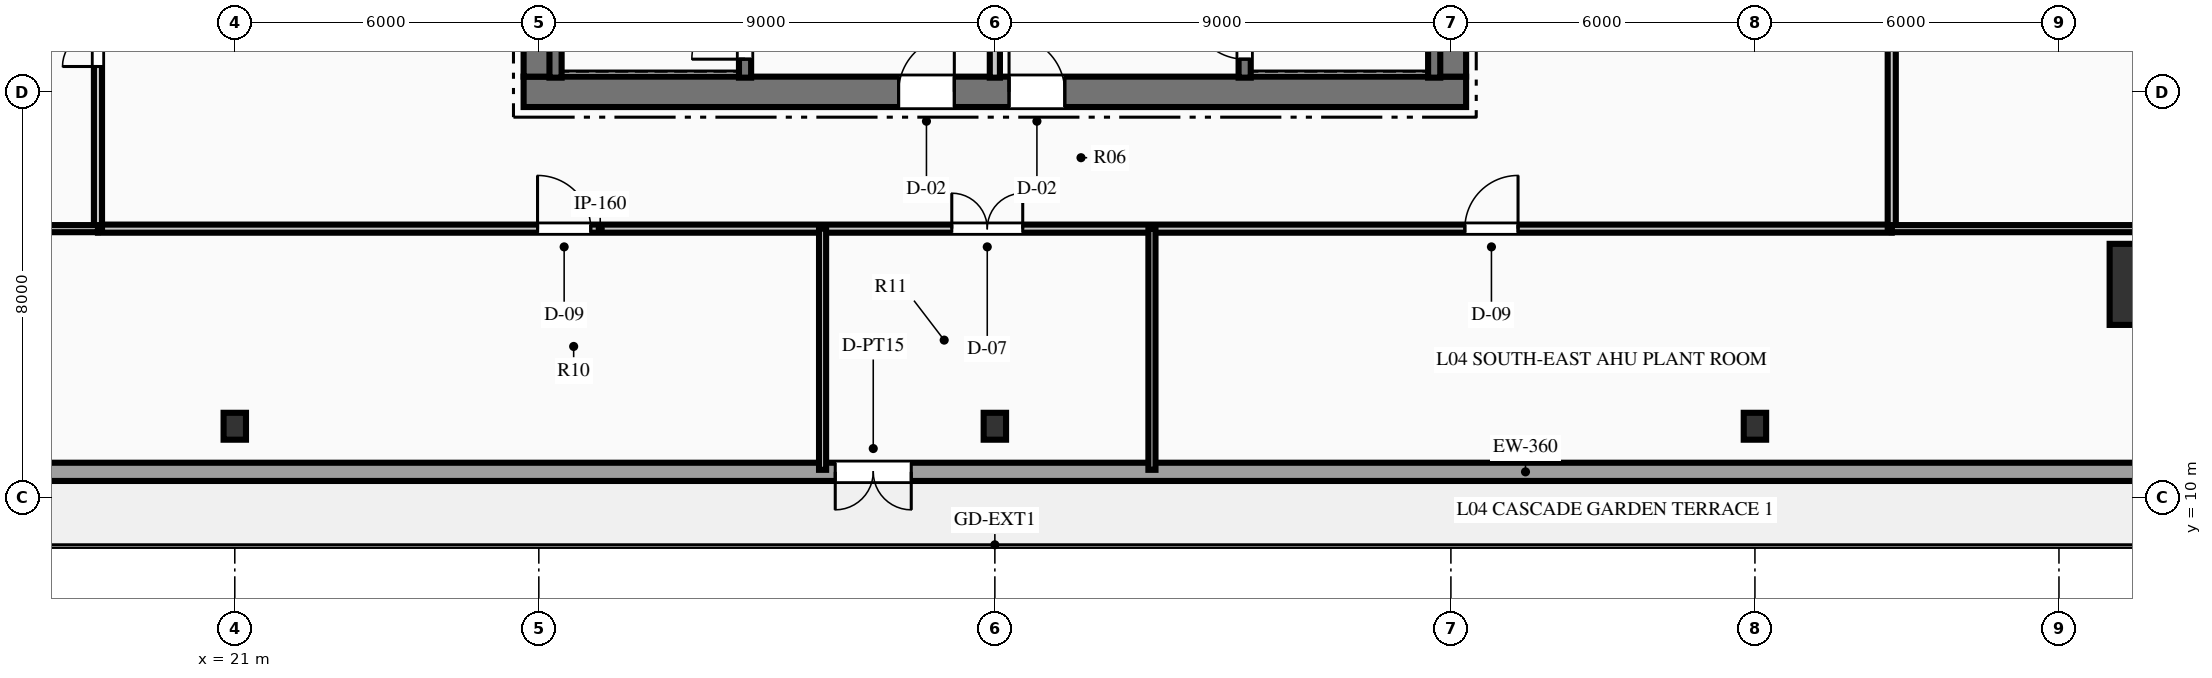
"""IFC4 building model, lengths in metres.
Left out: names, types, materials, properties, quantities, classifications, styles, units other than length and angle.
Written with IfcOpenShell. Run it as: python <this file> out.ifc"""

import sys

from ifc_helpers import new_model, si_unit, direction, frame, frame_2d, origin, origin_2d, place, context, subcontext, project, spatial, rectangle, hollow_rectangle, i_section, extrude, element, fill, save


model = new_model("IFC4")
c1 = context("Model", 3, precision=1e-05, world=origin(), true_north=direction((0.0, 1.0)))
c2 = subcontext(c1, "Body", "Model", "MODEL_VIEW")
j1 = project(units=[si_unit("LENGTHUNIT", "METRE"), si_unit("PLANEANGLEUNIT", "RADIAN")], contexts=[c1])
p1 = place(None, origin())
s1 = spatial("IfcSite", under=j1, at=p1, CompositionType="ELEMENT")
p2 = place(p1, origin())
s2 = spatial("IfcBuilding", under=s1, at=p2, CompositionType="ELEMENT")
p3 = place(p2, frame((0.0, 0.0, 22.2)))
s3 = spatial("IfcBuildingStorey", under=s2, at=p3, CompositionType="ELEMENT", Elevation=22.2)
p4 = place(p3, frame((26.7, 18.0, 0.0), z_axis=(0.0, 0.0, 1.0), x_axis=(1.0, 0.0, 0.0)))
e1 = element("IfcWall", 1, at=p4, inside=s3, PredefinedType="SHEAR", context=c2, shape_type="SweptSolid", body=[
    extrude(rectangle(XDim=18.6, YDim=0.6, at=frame_2d((9.3, 0.0))), origin(), (0.0, 0.0, 1.0), 6.0),
])
p5 = place(p4, frame((7.4, 0.0, 0.0)))
e2 = element("IfcOpeningElement", 2, at=p5, cuts=e1, PredefinedType="OPENING", context=c2, shape_type="SweptSolid", body=[
    extrude(rectangle(XDim=1.1, YDim=2.15, at=frame_2d((0.55, 1.075))), frame((0.0, 0.31, 0.0), z_axis=(0.0, -1.0, 0.0), x_axis=(1.0, 0.0, 0.0)), (0.0, 0.0, 1.0), 0.62),
])
p6 = place(p4, frame((9.58, 0.0, 0.0)))
e3 = element("IfcOpeningElement", 3, at=p6, cuts=e1, PredefinedType="OPENING", context=c2, shape_type="SweptSolid", body=[
    extrude(rectangle(XDim=1.1, YDim=2.15, at=frame_2d((0.55, 1.075))), frame((0.0, 0.31, 0.0), z_axis=(0.0, -1.0, 0.0), x_axis=(1.0, 0.0, 0.0)), (0.0, 0.0, 1.0), 0.62),
])
p7 = place(p3, frame((27.0, 18.3, 0.0), z_axis=(0.0, 0.0, 1.0), x_axis=(0.0, 1.0, 0.0)))
e4 = element("IfcWall", 4, at=p7, inside=s3, PredefinedType="SHEAR", context=c2, shape_type="SweptSolid", body=[
    extrude(rectangle(XDim=15.4, YDim=0.6, at=frame_2d((7.7, 0.0))), origin(), (0.0, 0.0, 1.0), 6.0),
])
p8 = place(p7, frame((9.94, 0.0, 0.0)))
e5 = element("IfcOpeningElement", 5, at=p8, cuts=e4, PredefinedType="OPENING", context=c2, shape_type="SweptSolid", body=[
    extrude(rectangle(XDim=1.4, YDim=2.2, at=frame_2d((0.7, 1.1))), frame((0.0, 0.31, 0.0), z_axis=(0.0, -1.0, 0.0), x_axis=(1.0, 0.0, 0.0)), (0.0, 0.0, 1.0), 0.62),
])
p9 = place(p3, frame((45.0, 18.3, 0.0), z_axis=(0.0, 0.0, 1.0), x_axis=(0.0, 1.0, 0.0)))
e6 = element("IfcWall", 6, at=p9, inside=s3, PredefinedType="SHEAR", context=c2, shape_type="SweptSolid", body=[
    extrude(rectangle(XDim=15.4, YDim=0.6, at=frame_2d((7.7, 0.0))), origin(), (0.0, 0.0, 1.0), 6.0),
])
p10 = place(p9, frame((9.94, 0.0, 0.0)))
e7 = element("IfcOpeningElement", 7, at=p10, cuts=e6, PredefinedType="OPENING", context=c2, shape_type="SweptSolid", body=[
    extrude(rectangle(XDim=1.4, YDim=2.2, at=frame_2d((0.7, 1.1))), frame((0.0, 0.31, 0.0), z_axis=(0.0, -1.0, 0.0), x_axis=(1.0, 0.0, 0.0)), (0.0, 0.0, 1.0), 0.62),
])
p11 = place(p3, frame((31.07, 18.28, 0.0), z_axis=(0.0, 0.0, 1.0), x_axis=(0.0, 1.0, 0.0)))
e8 = element("IfcWall", 8, at=p11, inside=s3, PredefinedType="SHEAR", context=c2, shape_type="SweptSolid", body=[
    extrude(rectangle(XDim=8.26, YDim=0.24, at=frame_2d((4.13, 0.0))), origin(), (0.0, 0.0, 1.0), 6.0),
])
p12 = place(p11, frame((0.365, 0.0, 0.0)))
e9 = element("IfcOpeningElement", 9, at=p12, cuts=e8, PredefinedType="OPENING", context=c2, shape_type="SweptSolid", body=[
    extrude(rectangle(XDim=1.05, YDim=2.15, at=frame_2d((0.525, 1.075))), frame((0.0, 0.13, 0.0), z_axis=(0.0, -1.0, 0.0), x_axis=(1.0, 0.0, 0.0)), (0.0, 0.0, 1.0), 0.26),
])
p13 = place(p3, frame((27.33, 18.28, 0.0), z_axis=(0.0, 0.0, 1.0), x_axis=(0.0, 1.0, 0.0)))
e10 = element("IfcWall", 10, at=p13, inside=s3, PredefinedType="SHEAR", context=c2, shape_type="SweptSolid", body=[
    extrude(rectangle(XDim=8.26, YDim=0.24, at=frame_2d((4.13, 0.0))), origin(), (0.0, 0.0, 1.0), 6.0),
])
p14 = place(p3, frame((40.93, 18.28, 0.0), z_axis=(0.0, 0.0, 1.0), x_axis=(0.0, 1.0, 0.0)))
e11 = element("IfcWall", 11, at=p14, inside=s3, PredefinedType="SHEAR", context=c2, shape_type="SweptSolid", body=[
    extrude(rectangle(XDim=8.26, YDim=0.24, at=frame_2d((4.13, 0.0))), origin(), (0.0, 0.0, 1.0), 6.0),
])
p15 = place(p14, frame((0.365, 0.0, 0.0)))
e12 = element("IfcOpeningElement", 12, at=p15, cuts=e11, PredefinedType="OPENING", context=c2, shape_type="SweptSolid", body=[
    extrude(rectangle(XDim=1.05, YDim=2.15, at=frame_2d((0.525, 1.075))), frame((0.0, 0.13, 0.0), z_axis=(0.0, -1.0, 0.0), x_axis=(1.0, 0.0, 0.0)), (0.0, 0.0, 1.0), 0.26),
])
p16 = place(p3, frame((44.67, 18.28, 0.0), z_axis=(0.0, 0.0, 1.0), x_axis=(0.0, 1.0, 0.0)))
e13 = element("IfcWall", 13, at=p16, inside=s3, PredefinedType="SHEAR", context=c2, shape_type="SweptSolid", body=[
    extrude(rectangle(XDim=8.26, YDim=0.24, at=frame_2d((4.13, 0.0))), origin(), (0.0, 0.0, 1.0), 6.0),
])
p17 = place(p3, frame((58.8, 14.2, 0.0), z_axis=(0.0, 0.0, 1.0), x_axis=(1.0, 0.0, 0.0)))
e14 = element("IfcColumn", 14, at=p17, inside=s3, PredefinedType="COLUMN", context=c2, shape_type="SweptSolid", body=[
    extrude(hollow_rectangle(XDim=1.6, YDim=1.6, WallThickness=0.08, at=origin_2d()), origin(), (0.0, 0.0, 1.0), 6.0),
])
for number, where, z_axis, x_axis in (
    (15, (21.0, 11.4, 0.0), (0.0, 0.0, 1.0), (1.0, 0.0, 0.0)),
    (16, (51.0, 11.4, 0.0), (0.0, 0.0, 1.0), (1.0, 0.0, 0.0)),
    (17, (36.0, 11.4, 0.0), (0.0, 0.0, 1.0), (1.0, 0.0, 0.0)),
):
    element("IfcColumn", number, at=place(p3, frame(where, z_axis=z_axis, x_axis=x_axis)), inside=s3, PredefinedType="COLUMN", context=c2, shape_type="SweptSolid", body=[
        extrude(i_section(OverallWidth=0.442, OverallDepth=0.531, WebThickness=0.066, FlangeThickness=0.106, at=origin_2d()), origin(), (0.0, 0.0, 1.0), 6.0),
    ])
p18 = place(p3, frame((59.8, 10.5, 0.0), z_axis=(0.0, 0.0, 1.0), x_axis=(-1.0, 0.0, 0.0)))
e18 = element("IfcWall", 18, at=p18, inside=s3, PredefinedType="STANDARD", context=c2, shape_type="SweptSolid", body=[
    extrude(rectangle(XDim=47.6, YDim=0.36, at=frame_2d((23.8, 0.0))), origin(), (0.0, 0.0, 1.0), 5.59),
])
p19 = place(p18, frame((25.45, 0.0, 0.0)))
e19 = element("IfcOpeningElement", 19, at=p19, cuts=e18, PredefinedType="OPENING", context=c2, shape_type="SweptSolid", body=[
    extrude(rectangle(XDim=1.5, YDim=2.25, at=frame_2d((0.75, 1.125))), frame((0.0, 0.19, 0.0), z_axis=(0.0, -1.0, 0.0), x_axis=(1.0, 0.0, 0.0)), (0.0, 0.0, 1.0), 0.38),
])
p20 = place(p3, frame((36.0, 18.28, 0.0), z_axis=(0.0, 0.0, 1.0), x_axis=(0.0, 1.0, 0.0)))
e20 = element("IfcWall", 20, at=p20, inside=s3, PredefinedType="PARTITIONING", context=c2, shape_type="SweptSolid", body=[
    extrude(rectangle(XDim=3.77, YDim=0.2, at=frame_2d((1.885, 0.0))), origin(), (0.0, 0.0, 1.0), 5.59),
])
p21 = place(p3, frame((18.3, 15.3, 0.0), z_axis=(0.0, 0.0, 1.0), x_axis=(1.0, 0.0, 0.0)))
e21 = element("IfcWall", 21, at=p21, inside=s3, PredefinedType="PARTITIONING", context=c2, shape_type="SweptSolid", body=[
    extrude(rectangle(XDim=35.4, YDim=0.16, at=frame_2d((17.7, 0.0))), origin(), (0.0, 0.0, 1.0), 5.59),
])
p22 = place(p21, frame((8.675, 0.0, 0.0)))
e22 = element("IfcOpeningElement", 22, at=p22, cuts=e21, PredefinedType="OPENING", context=c2, shape_type="SweptSolid", body=[
    extrude(rectangle(XDim=1.05, YDim=2.15, at=frame_2d((0.525, 1.075))), frame((0.0, 0.09, 0.0), z_axis=(0.0, -1.0, 0.0), x_axis=(1.0, 0.0, 0.0)), (0.0, 0.0, 1.0), 0.18),
])
p23 = place(p21, frame((16.85, 0.0, 0.0)))
e23 = element("IfcOpeningElement", 23, at=p23, cuts=e21, PredefinedType="OPENING", context=c2, shape_type="SweptSolid", body=[
    extrude(rectangle(XDim=1.4, YDim=2.2, at=frame_2d((0.7, 1.1))), frame((0.0, 0.09, 0.0), z_axis=(0.0, -1.0, 0.0), x_axis=(1.0, 0.0, 0.0)), (0.0, 0.0, 1.0), 0.18),
])
p24 = place(p21, frame((26.975, 0.0, 0.0)))
e24 = element("IfcOpeningElement", 24, at=p24, cuts=e21, PredefinedType="OPENING", context=c2, shape_type="SweptSolid", body=[
    extrude(rectangle(XDim=1.05, YDim=2.15, at=frame_2d((0.525, 1.075))), frame((0.0, 0.09, 0.0), z_axis=(0.0, -1.0, 0.0), x_axis=(1.0, 0.0, 0.0)), (0.0, 0.0, 1.0), 0.18),
])
p25 = place(p3, frame((18.3, 15.3, 0.0), z_axis=(0.0, 0.0, 1.0), x_axis=(0.0, 1.0, 0.0)))
e25 = element("IfcWall", 25, at=p25, inside=s3, PredefinedType="PARTITIONING", context=c2, shape_type="SweptSolid", body=[
    extrude(rectangle(XDim=6.55, YDim=0.16, at=frame_2d((3.275, 0.0))), origin(), (0.0, 0.0, 1.0), 5.59),
])
p26 = place(p25, frame((3.2, 0.0, 0.0)))
e26 = element("IfcOpeningElement", 26, at=p26, cuts=e25, PredefinedType="OPENING", context=c2, shape_type="SweptSolid", body=[
    extrude(rectangle(XDim=1.4, YDim=2.2, at=frame_2d((0.7, 1.1))), frame((0.0, 0.09, 0.0), z_axis=(0.0, -1.0, 0.0), x_axis=(1.0, 0.0, 0.0)), (0.0, 0.0, 1.0), 0.18),
])
p27 = place(p3, frame((53.7, 15.3, 0.0), z_axis=(0.0, 0.0, 1.0), x_axis=(0.0, 1.0, 0.0)))
e27 = element("IfcWall", 27, at=p27, inside=s3, PredefinedType="PARTITIONING", context=c2, shape_type="SweptSolid", body=[
    extrude(rectangle(XDim=6.55, YDim=0.16, at=frame_2d((3.275, 0.0))), origin(), (0.0, 0.0, 1.0), 5.59),
])
p28 = place(p27, frame((4.65, 0.0, 0.0)))
e28 = element("IfcOpeningElement", 28, at=p28, cuts=e27, PredefinedType="OPENING", context=c2, shape_type="SweptSolid", body=[
    extrude(rectangle(XDim=1.4, YDim=2.2, at=frame_2d((0.7, 1.1))), frame((0.0, 0.09, 0.0), z_axis=(0.0, -1.0, 0.0), x_axis=(1.0, 0.0, 0.0)), (0.0, 0.0, 1.0), 0.18),
])
for number, where, z_axis, x_axis in (
    (29, (9.04, 15.3, 0.0), (0.0, 0.0, 1.0), (1.0, 0.0, 0.0)),
    (30, (53.7, 15.3, 0.0), (0.0, 0.0, 1.0), (1.0, 0.0, 0.0)),
):
    element("IfcWall", number, at=place(p3, frame(where, z_axis=z_axis, x_axis=x_axis)), inside=s3, PredefinedType="PARTITIONING", context=c2, shape_type="SweptSolid", body=[
        extrude(rectangle(XDim=9.26, YDim=0.14, at=frame_2d((4.63, 0.0))), origin(), (0.0, 0.0, 1.0), 5.59),
    ])
p29 = place(p3, frame((32.6, 10.54, 0.0), z_axis=(0.0, 0.0, 1.0), x_axis=(0.0, 1.0, 0.0)))
e31 = element("IfcWall", 31, at=p29, inside=s3, PredefinedType="PARTITIONING", context=c2, shape_type="SweptSolid", body=[
    extrude(rectangle(XDim=4.76, YDim=0.14, at=frame_2d((2.38, 0.0))), origin(), (0.0, 0.0, 1.0), 5.59),
])
p30 = place(p3, frame((39.1, 10.54, 0.0), z_axis=(0.0, 0.0, 1.0), x_axis=(0.0, 1.0, 0.0)))
e32 = element("IfcWall", 32, at=p30, inside=s3, PredefinedType="PARTITIONING", context=c2, shape_type="SweptSolid", body=[
    extrude(rectangle(XDim=4.76, YDim=0.14, at=frame_2d((2.38, 0.0))), origin(), (0.0, 0.0, 1.0), 4.385),
])
p31 = place(p19, origin())
e33 = element("IfcDoor", 33, at=p31, inside=s3, OperationType="DOUBLE_DOOR_SINGLE_SWING", PredefinedType="DOOR", context=c2, shape_type="SweptSolid", body=[
    extrude(rectangle(XDim=1.5, YDim=2.25, at=frame_2d((0.75, 1.125))), frame((0.0, 0.025, 0.0), z_axis=(0.0, -1.0, 0.0), x_axis=(1.0, 0.0, 0.0)), (0.0, 0.0, 1.0), 0.05),
])
fill(e19, e33)
p32 = place(p12, origin())
e34 = element("IfcDoor", 34, at=p32, inside=s3, OperationType="SINGLE_SWING_LEFT", PredefinedType="DOOR", context=c2, shape_type="SweptSolid", body=[
    extrude(rectangle(XDim=1.05, YDim=2.15, at=frame_2d((0.525, 1.075))), frame((0.0, 0.025, 0.0), z_axis=(0.0, -1.0, 0.0), x_axis=(1.0, 0.0, 0.0)), (0.0, 0.0, 1.0), 0.05),
])
fill(e9, e34)
p33 = place(p15, origin())
e35 = element("IfcDoor", 35, at=p33, inside=s3, OperationType="SINGLE_SWING_RIGHT", PredefinedType="DOOR", context=c2, shape_type="SweptSolid", body=[
    extrude(rectangle(XDim=1.05, YDim=2.15, at=frame_2d((0.525, 1.075))), frame((0.0, 0.025, 0.0), z_axis=(0.0, -1.0, 0.0), x_axis=(1.0, 0.0, 0.0)), (0.0, 0.0, 1.0), 0.05),
])
fill(e12, e35)
p34 = place(p5, origin())
e36 = element("IfcDoor", 36, at=p34, inside=s3, OperationType="SINGLE_SWING_RIGHT", PredefinedType="DOOR", context=c2, shape_type="SweptSolid", body=[
    extrude(rectangle(XDim=1.1, YDim=2.15, at=frame_2d((0.55, 1.075))), frame((0.0, 0.025, 0.0), z_axis=(0.0, -1.0, 0.0), x_axis=(1.0, 0.0, 0.0)), (0.0, 0.0, 1.0), 0.05),
])
fill(e2, e36)
p35 = place(p6, origin())
e37 = element("IfcDoor", 37, at=p35, inside=s3, OperationType="SINGLE_SWING_LEFT", PredefinedType="DOOR", context=c2, shape_type="SweptSolid", body=[
    extrude(rectangle(XDim=1.1, YDim=2.15, at=frame_2d((0.55, 1.075))), frame((0.0, 0.025, 0.0), z_axis=(0.0, -1.0, 0.0), x_axis=(1.0, 0.0, 0.0)), (0.0, 0.0, 1.0), 0.05),
])
fill(e3, e37)
p36 = place(p22, origin())
e38 = element("IfcDoor", 38, at=p36, inside=s3, OperationType="SINGLE_SWING_LEFT", PredefinedType="DOOR", context=c2, shape_type="SweptSolid", body=[
    extrude(rectangle(XDim=1.05, YDim=2.15, at=frame_2d((0.525, 1.075))), frame((0.0, 0.025, 0.0), z_axis=(0.0, -1.0, 0.0), x_axis=(1.0, 0.0, 0.0)), (0.0, 0.0, 1.0), 0.05),
])
fill(e22, e38)
p37 = place(p23, origin())
e39 = element("IfcDoor", 39, at=p37, inside=s3, OperationType="DOUBLE_DOOR_SINGLE_SWING", PredefinedType="DOOR", context=c2, shape_type="SweptSolid", body=[
    extrude(rectangle(XDim=1.4, YDim=2.2, at=frame_2d((0.7, 1.1))), frame((0.0, 0.025, 0.0), z_axis=(0.0, -1.0, 0.0), x_axis=(1.0, 0.0, 0.0)), (0.0, 0.0, 1.0), 0.05),
])
fill(e23, e39)
p38 = place(p24, origin())
e40 = element("IfcDoor", 40, at=p38, inside=s3, OperationType="SINGLE_SWING_RIGHT", PredefinedType="DOOR", context=c2, shape_type="SweptSolid", body=[
    extrude(rectangle(XDim=1.05, YDim=2.15, at=frame_2d((0.525, 1.075))), frame((0.0, 0.025, 0.0), z_axis=(0.0, -1.0, 0.0), x_axis=(1.0, 0.0, 0.0)), (0.0, 0.0, 1.0), 0.05),
])
fill(e24, e40)
p39 = place(p26, origin())
e41 = element("IfcDoor", 41, at=p39, inside=s3, OperationType="DOUBLE_DOOR_SINGLE_SWING", PredefinedType="DOOR", context=c2, shape_type="SweptSolid", body=[
    extrude(rectangle(XDim=1.4, YDim=2.2, at=frame_2d((0.7, 1.1))), frame((0.0, 0.025, 0.0), z_axis=(0.0, -1.0, 0.0), x_axis=(1.0, 0.0, 0.0)), (0.0, 0.0, 1.0), 0.05),
])
fill(e26, e41)
save(model, sys.argv[1])
